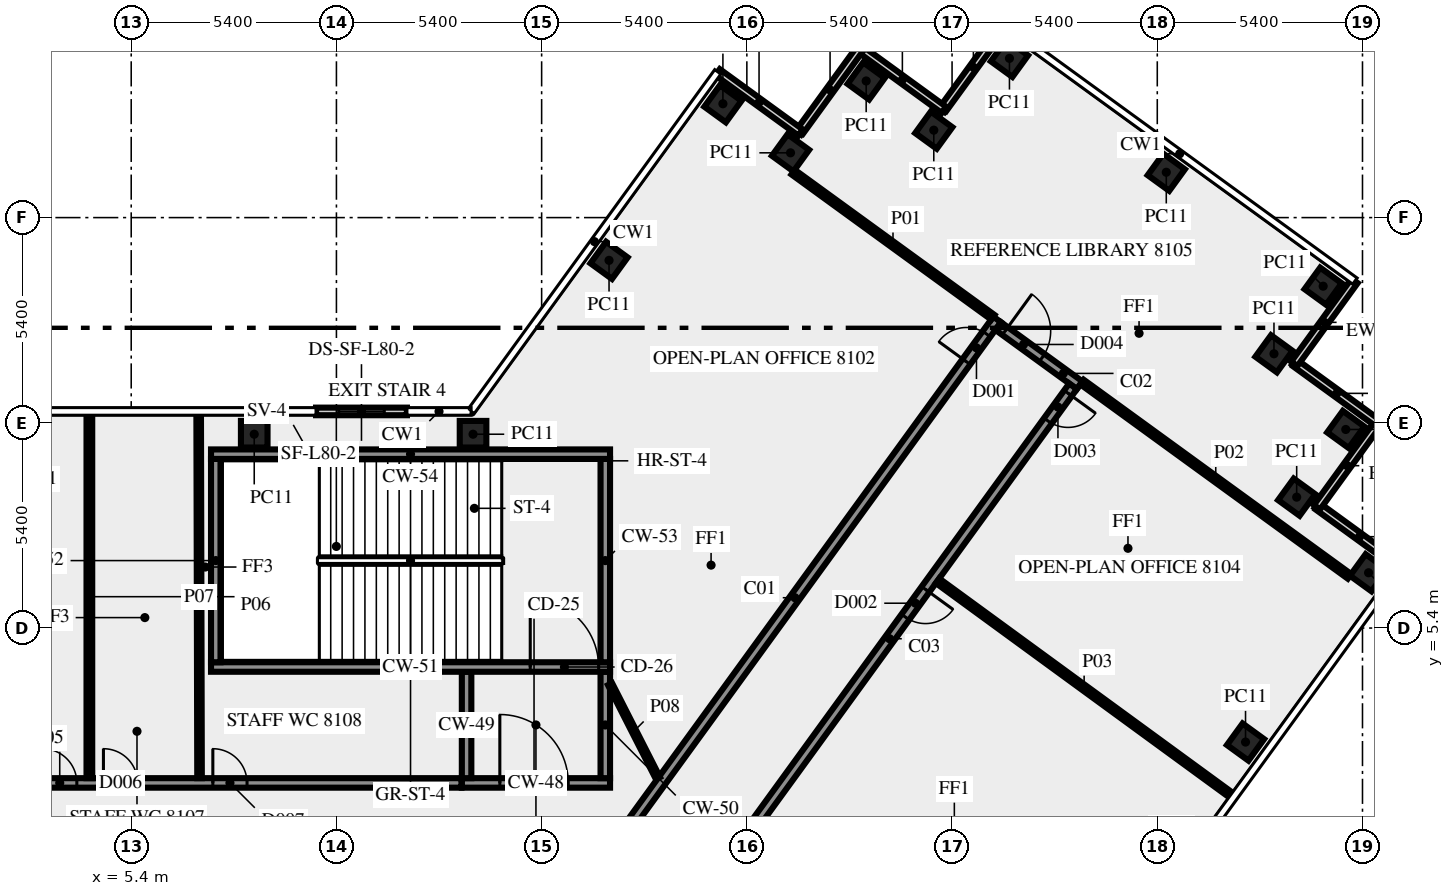
"""IFC4 building model, lengths in metres.
Left out: names, types, materials, properties, quantities, classifications, styles, units other than length and angle.
Written with IfcOpenShell. Run it as: python <this file> out.ifc"""

import sys

from ifc_helpers import new_model, si_unit, direction, frame, frame_2d, origin, origin_2d, place, context, subcontext, project, spatial, rectangle, extrude, element, fill, save


model = new_model("IFC4")
c1 = context("Model", 3, precision=1e-05, world=origin(), true_north=direction((0.0, 1.0)))
c2 = subcontext(c1, "Body", "Model", "MODEL_VIEW")
j1 = project(units=[si_unit("LENGTHUNIT", "METRE"), si_unit("PLANEANGLEUNIT", "RADIAN")], contexts=[c1])
p1 = place(None, origin())
s1 = spatial("IfcSite", under=j1, at=p1, CompositionType="ELEMENT")
p2 = place(p1, origin())
s2 = spatial("IfcBuilding", under=s1, at=p2, CompositionType="ELEMENT")
p3 = place(p2, frame((0.0, 0.0, 347.0)))
s3 = spatial("IfcBuildingStorey", under=s2, at=p3, CompositionType="ELEMENT", Elevation=347.0)
for number, where, z_axis, x_axis in (
    (1, (34.722, 2.4, 0.0), (0.0, 0.0, 1.0), (0.588, 0.809, 0.0)),
    (2, (37.96, 6.855, 0.0), (0.0, 0.0, 1.0), (0.588, 0.809, 0.0)),
    (3, (36.068, 8.844, 0.0), (0.0, 0.0, 1.0), (0.588, 0.809, 0.0)),
    (4, (37.36, 10.625, 0.0), (0.0, 0.0, 1.0), (0.588, 0.809, 0.0)),
    (5, (35.471, 12.616, 0.0), (0.0, 0.0, 1.0), (-0.809, 0.588, 0.0)),
    (6, (36.765, 14.395, 0.0), (0.0, 0.0, 1.0), (-0.809, 0.588, 0.0)),
    (7, (32.637, 17.393, 0.0), (0.0, 0.0, 1.0), (-0.809, 0.588, 0.0)),
    (8, (28.51, 20.39, 0.0), (0.0, 0.0, 1.0), (-0.588, -0.809, 0.0)),
    (9, (26.519, 18.5, 0.0), (0.0, 0.0, 1.0), (-0.809, 0.588, 0.0)),
    (10, (24.74, 19.795, 0.0), (0.0, 0.0, 1.0), (-0.588, -0.809, 0.0)),
    (11, (22.749, 17.904, 0.0), (0.0, 0.0, 1.0), (-0.588, -0.809, 0.0)),
    (12, (20.97, 19.195, 0.0), (0.0, 0.0, 1.0), (-0.588, -0.809, 0.0)),
    (13, (17.974, 15.075, 0.0), (0.0, 0.0, 1.0), (-0.588, -0.809, 0.0)),
    (14, (14.395, 10.5, 0.0), (0.0, 0.0, 1.0), (-1.0, 0.0, 0.0)),
    (15, (8.637, 10.5, 0.0), (0.0, 0.0, 1.0), (-1.0, 0.0, 0.0)),
):
    element("IfcColumn", number, at=place(p3, frame(where, z_axis=z_axis, x_axis=x_axis)), inside=s3, PredefinedType="COLUMN", context=c2, shape_type="SweptSolid", body=[
        extrude(rectangle(XDim=0.7, YDim=0.7, at=origin_2d()), origin(), (0.0, 0.0, 1.0), 3.65),
    ])
for number, where, z_axis, x_axis in (
    (16, (38.814, 7.01, 0.0), (0.0, 0.0, 1.0), (-0.809, 0.588, 0.0)),
    (17, (36.602, 8.58, 0.0), (0.0, 0.0, 1.0), (0.588, 0.809, 0.0)),
    (18, (38.216, 10.782, 0.0), (0.0, 0.0, 1.0), (-0.809, 0.588, 0.0)),
    (19, (36.005, 12.352, 0.0), (0.0, 0.0, 1.0), (0.588, 0.809, 0.0)),
):
    element("IfcWall", number, at=place(p3, frame(where, z_axis=z_axis, x_axis=x_axis)), inside=s3, PredefinedType="SOLIDWALL", context=c2, shape_type="SweptSolid", body=[
        extrude(rectangle(XDim=2.7, YDim=0.2, at=frame_2d((1.35, 0.0))), origin(), (0.0, 0.0, 1.0), 3.65),
    ])
for number, where, z_axis, x_axis in (
    (20, (28.354, 21.247, 0.0), (0.0, 0.0, 1.0), (-0.588, -0.809, 0.0)),
    (21, (26.785, 19.036, 0.0), (0.0, 0.0, 1.0), (-0.809, 0.588, 0.0)),
):
    element("IfcWall", number, at=place(p3, frame(where, z_axis=z_axis, x_axis=x_axis)), inside=s3, PredefinedType="SOLIDWALL", context=c2, shape_type="SweptSolid", body=[
        extrude(rectangle(XDim=2.7, YDim=0.2, at=frame_2d((1.35, 0.0))), origin(), (0.0, 0.0, 1.0), 3.65),
    ])
for number, where, z_axis, x_axis in (
    (22, (24.583, 20.65, 0.0), (0.0, 0.0, 1.0), (-0.588, -0.809, 0.0)),
    (23, (23.013, 18.438, 0.0), (0.0, 0.0, 1.0), (-0.809, 0.588, 0.0)),
):
    element("IfcWall", number, at=place(p3, frame(where, z_axis=z_axis, x_axis=x_axis)), inside=s3, PredefinedType="SOLIDWALL", context=c2, shape_type="SweptSolid", body=[
        extrude(rectangle(XDim=2.7, YDim=0.2, at=frame_2d((1.35, 0.0))), origin(), (0.0, 0.0, 1.0), 3.65),
    ])
p4 = place(p3, frame((12.655, 11.1, 0.0), z_axis=(0.0, 0.0, 1.0), x_axis=(-1.0, 0.0, 0.0)))
e24 = element("IfcWall", 24, at=p4, inside=s3, PredefinedType="SOLIDWALL", context=c2, shape_type="SweptSolid", body=[
    extrude(rectangle(XDim=2.392, YDim=0.2, at=frame_2d((1.196, 0.0))), origin(), (0.0, 0.0, 1.0), 3.65),
])
p5 = place(p4, frame((0.596, 0.0, 1.0)))
e25 = element("IfcOpeningElement", 25, at=p5, cuts=e24, PredefinedType="OPENING", context=c2, shape_type="SweptSolid", body=[
    extrude(rectangle(XDim=1.2, YDim=1.2, at=frame_2d((0.6, 0.6))), frame((0.0, 0.11, 0.0), z_axis=(0.0, -1.0, 0.0), x_axis=(1.0, 0.0, 0.0)), (0.0, 0.0, 1.0), 0.22),
])
p6 = place(p3, frame((14.1, 1.325, 0.0), z_axis=(0.0, 0.0, 1.0), x_axis=(1.0, 0.0, 0.0)))
e26 = element("IfcWall", 26, at=p6, inside=s3, PredefinedType="SHEAR", context=c2, shape_type="SweptSolid", body=[
    extrude(rectangle(XDim=3.9, YDim=0.25, at=frame_2d((1.95, 0.0))), origin(), (0.0, 0.0, 1.0), 3.65),
])
p7 = place(p6, frame((1.0, 0.0, 0.0)))
e27 = element("IfcOpeningElement", 27, at=p7, cuts=e26, PredefinedType="OPENING", context=c2, shape_type="SweptSolid", body=[
    extrude(rectangle(XDim=1.8, YDim=2.1, at=frame_2d((0.9, 1.05))), frame((0.0, 0.135, 0.0), z_axis=(0.0, -1.0, 0.0), x_axis=(1.0, 0.0, 0.0)), (0.0, 0.0, 1.0), 0.27),
])
for number, where, z_axis, x_axis in (
    (28, (14.225, 1.45, 0.0), (0.0, 0.0, 1.0), (0.0, 1.0, 0.0)),
    (29, (17.875, 1.45, 0.0), (0.0, 0.0, 1.0), (0.0, 1.0, 0.0)),
):
    element("IfcWall", number, at=place(p3, frame(where, z_axis=z_axis, x_axis=x_axis)), inside=s3, PredefinedType="SHEAR", context=c2, shape_type="SweptSolid", body=[
        extrude(rectangle(XDim=2.8, YDim=0.25, at=frame_2d((1.4, 0.0))), origin(), (0.0, 0.0, 1.0), 3.65),
    ])
p8 = place(p3, frame((7.5, 4.375, 0.0), z_axis=(0.0, 0.0, 1.0), x_axis=(1.0, 0.0, 0.0)))
e30 = element("IfcWall", 30, at=p8, inside=s3, PredefinedType="SHEAR", context=c2, shape_type="SweptSolid", body=[
    extrude(rectangle(XDim=10.5, YDim=0.25, at=frame_2d((5.25, 0.0))), origin(), (0.0, 0.0, 1.0), 3.65),
])
p9 = place(p8, frame((8.4, 0.0, 0.0)))
e31 = element("IfcOpeningElement", 31, at=p9, cuts=e30, PredefinedType="OPENING", context=c2, shape_type="SweptSolid", body=[
    extrude(rectangle(XDim=1.8, YDim=2.1, at=frame_2d((0.9, 1.05))), frame((0.0, 0.135, 0.0), z_axis=(0.0, -1.0, 0.0), x_axis=(1.0, 0.0, 0.0)), (0.0, 0.0, 1.0), 0.27),
])
for number, where, z_axis, x_axis in (
    (32, (7.625, 4.5, 0.0), (0.0, 0.0, 1.0), (0.0, 1.0, 0.0)),
    (33, (17.875, 4.5, 0.0), (0.0, 0.0, 1.0), (0.0, 1.0, 0.0)),
):
    element("IfcWall", number, at=place(p3, frame(where, z_axis=z_axis, x_axis=x_axis)), inside=s3, PredefinedType="SHEAR", context=c2, shape_type="SweptSolid", body=[
        extrude(rectangle(XDim=5.35, YDim=0.25, at=frame_2d((2.675, 0.0))), origin(), (0.0, 0.0, 1.0), 3.65),
    ])
p10 = place(p3, frame((7.5, 9.975, 0.0), z_axis=(0.0, 0.0, 1.0), x_axis=(1.0, 0.0, 0.0)))
e34 = element("IfcWall", 34, at=p10, inside=s3, PredefinedType="SHEAR", context=c2, shape_type="SweptSolid", body=[
    extrude(rectangle(XDim=10.5, YDim=0.25, at=frame_2d((5.25, 0.0))), origin(), (0.0, 0.0, 1.0), 3.65),
])
p11 = place(p10, frame((2.0, 0.0, 1.0)))
e35 = element("IfcOpeningElement", 35, at=p11, cuts=e34, PredefinedType="OPENING", context=c2, shape_type="SweptSolid", body=[
    extrude(rectangle(XDim=1.2, YDim=1.2, at=frame_2d((0.6, 0.6))), frame((0.0, 0.135, 0.0), z_axis=(0.0, -1.0, 0.0), x_axis=(1.0, 0.0, 0.0)), (0.0, 0.0, 1.0), 0.27),
])
p12 = place(p3, frame((17.545, -1.125, 0.0), z_axis=(0.0, 0.0, 1.0), x_axis=(0.58779555165, 0.809009511354, 0.0)))
e36 = element("IfcWall", 36, at=p12, inside=s3, PredefinedType="SOLIDWALL", context=c2, shape_type="SweptSolid", body=[
    extrude(rectangle(XDim=18.103, YDim=0.25, at=frame_2d((9.052, 0.0))), origin(), (0.0, 0.0, 1.0), 3.65),
])
p13 = place(p12, frame((16.728, 0.0, 0.0)))
e37 = element("IfcOpeningElement", 37, at=p13, cuts=e36, PredefinedType="OPENING", context=c2, shape_type="SweptSolid", body=[
    extrude(rectangle(XDim=0.9, YDim=2.1, at=frame_2d((0.45, 1.05))), frame((0.0, 0.135, 0.0), z_axis=(0.0, -1.0, 0.0), x_axis=(1.0, 0.0, 0.0)), (0.0, 0.0, 1.0), 0.27),
])
p14 = place(p3, frame((28.213, 13.346, 0.0), z_axis=(0.0, 0.0, 1.0), x_axis=(0.809006914995, -0.587799125119, 0.0)))
e38 = element("IfcWall", 38, at=p14, inside=s3, PredefinedType="SOLIDWALL", context=c2, shape_type="SweptSolid", body=[
    extrude(rectangle(XDim=2.65, YDim=0.25, at=frame_2d((1.325, 0.0))), origin(), (0.0, 0.0, 1.0), 3.65),
])
p15 = place(p14, frame((0.225, 0.0, 0.0)))
e39 = element("IfcOpeningElement", 39, at=p15, cuts=e38, PredefinedType="OPENING", context=c2, shape_type="SweptSolid", body=[
    extrude(rectangle(XDim=1.2, YDim=2.1, at=frame_2d((0.6, 1.05))), frame((0.0, 0.135, 0.0), z_axis=(0.0, -1.0, 0.0), x_axis=(1.0, 0.0, 0.0)), (0.0, 0.0, 1.0), 0.27),
])
p16 = place(p3, frame((30.183, 11.761, 0.0), z_axis=(0.0, 0.0, 1.0), x_axis=(-0.587781762867, -0.80901952958, 0.0)))
e40 = element("IfcWall", 40, at=p16, inside=s3, PredefinedType="SOLIDWALL", context=c2, shape_type="SweptSolid", body=[
    extrude(rectangle(XDim=16.42, YDim=0.25, at=frame_2d((8.21, 0.0))), origin(), (0.0, 0.0, 1.0), 3.65),
])
p17 = place(p16, frame((0.225, 0.0, 0.0)))
e41 = element("IfcOpeningElement", 41, at=p17, cuts=e40, PredefinedType="OPENING", context=c2, shape_type="SweptSolid", body=[
    extrude(rectangle(XDim=0.9, YDim=2.1, at=frame_2d((0.45, 1.05))), frame((0.0, 0.135, 0.0), z_axis=(0.0, -1.0, 0.0), x_axis=(1.0, 0.0, 0.0)), (0.0, 0.0, 1.0), 0.27),
])
p18 = place(p16, frame((6.605, 0.0, 0.0)))
e42 = element("IfcOpeningElement", 42, at=p18, cuts=e40, PredefinedType="OPENING", context=c2, shape_type="SweptSolid", body=[
    extrude(rectangle(XDim=0.9, YDim=2.1, at=frame_2d((0.45, 1.05))), frame((0.0, 0.135, 0.0), z_axis=(0.0, -1.0, 0.0), x_axis=(1.0, 0.0, 0.0)), (0.0, 0.0, 1.0), 0.27),
])
p19 = place(p3, frame((-5.246, 1.325, 0.0), z_axis=(0.0, 0.0, 1.0), x_axis=(1.0, 0.0, 0.0)))
e43 = element("IfcWall", 43, at=p19, inside=s3, PredefinedType="SOLIDWALL", context=c2, shape_type="SweptSolid", body=[
    extrude(rectangle(XDim=19.336, YDim=0.25, at=frame_2d((9.668, 0.0))), origin(), (0.0, 0.0, 1.0), 3.65),
])
p20 = place(p19, frame((8.315, 0.0, 0.0)))
e44 = element("IfcOpeningElement", 44, at=p20, cuts=e43, PredefinedType="OPENING", context=c2, shape_type="SweptSolid", body=[
    extrude(rectangle(XDim=0.9, YDim=2.1, at=frame_2d((0.45, 1.05))), frame((0.0, 0.135, 0.0), z_axis=(0.0, -1.0, 0.0), x_axis=(1.0, 0.0, 0.0)), (0.0, 0.0, 1.0), 0.27),
])
p21 = place(p19, frame((9.915, 0.0, 0.0)))
e45 = element("IfcOpeningElement", 45, at=p21, cuts=e43, PredefinedType="OPENING", context=c2, shape_type="SweptSolid", body=[
    extrude(rectangle(XDim=0.9, YDim=2.1, at=frame_2d((0.45, 1.05))), frame((0.0, 0.135, 0.0), z_axis=(0.0, -1.0, 0.0), x_axis=(1.0, 0.0, 0.0)), (0.0, 0.0, 1.0), 0.27),
])
p22 = place(p19, frame((12.794, 0.0, 0.0)))
e46 = element("IfcOpeningElement", 46, at=p22, cuts=e43, PredefinedType="OPENING", context=c2, shape_type="SweptSolid", body=[
    extrude(rectangle(XDim=0.9, YDim=2.1, at=frame_2d((0.45, 1.05))), frame((0.0, 0.135, 0.0), z_axis=(0.0, -1.0, 0.0), x_axis=(1.0, 0.0, 0.0)), (0.0, 0.0, 1.0), 0.27),
])
p23 = place(p3, frame((28.073, 13.578, 0.0), z_axis=(0.0, 0.0, 1.0), x_axis=(-0.809000932727, 0.587807358619, 0.0)))
e47 = element("IfcWall", 47, at=p23, inside=s3, PredefinedType="PARTITIONING", context=c2, shape_type="SweptSolid", body=[
    extrude(rectangle(XDim=6.496, YDim=0.15, at=frame_2d((3.248, 0.0))), origin(), (0.0, 0.0, 1.0), 3.65),
])
p24 = place(p3, frame((37.458, 6.76, 0.0), z_axis=(0.0, 0.0, 1.0), x_axis=(-0.809016295501, 0.587786214209, 0.0)))
e48 = element("IfcWall", 48, at=p24, inside=s3, PredefinedType="PARTITIONING", context=c2, shape_type="SweptSolid", body=[
    extrude(rectangle(XDim=8.7, YDim=0.15, at=frame_2d((4.35, 0.0))), origin(), (0.0, 0.0, 1.0), 3.65),
])
for number, where, z_axis, x_axis in (
    (49, (26.619, 6.643, 0.0), (0.0, 0.0, 1.0), (0.808, -0.59, 0.0)),
    (50, (4.299, 1.45, 0.0), (0.0, 0.0, 1.0), (0.0, 1.0, 0.0)),
):
    element("IfcWall", number, at=place(p3, frame(where, z_axis=z_axis, x_axis=x_axis)), inside=s3, PredefinedType="PARTITIONING", context=c2, shape_type="SweptSolid", body=[
        extrude(rectangle(XDim=9.55, YDim=0.15, at=frame_2d((4.775, 0.0))), origin(), (0.0, 0.0, 1.0), 2.95),
    ])
p25 = place(p3, frame((7.198, 1.45, 0.0), z_axis=(0.0, 0.0, 1.0), x_axis=(-0.002377476217, 0.999997173799, 0.0)))
e51 = element("IfcWall", 51, at=p25, inside=s3, PredefinedType="PARTITIONING", context=c2, shape_type="SweptSolid", body=[
    extrude(rectangle(XDim=9.55, YDim=0.12, at=frame_2d((4.775, 0.0))), origin(), (0.0, 0.0, 1.0), 2.95),
])
p26 = place(p3, frame((18.0, 3.925, 0.0), z_axis=(0.0, 0.0, 1.0), x_axis=(0.453950796792, -0.891026752736, 0.0)))
e52 = element("IfcWall", 52, at=p26, inside=s3, PredefinedType="PARTITIONING", context=c2, shape_type="SweptSolid", body=[
    extrude(rectangle(XDim=2.778, YDim=0.12, at=frame_2d((1.389, 0.0))), origin(), (0.0, 0.0, 1.0), 3.65),
])
p27 = place(p5, origin())
e53 = element("IfcWindow", 53, at=p27, inside=s3, PartitioningType="SINGLE_PANEL", PredefinedType="WINDOW", context=c2, shape_type="SweptSolid", body=[
    extrude(rectangle(XDim=1.2, YDim=1.2, at=frame_2d((0.6, 0.6))), frame((0.0, 0.03, 0.0), z_axis=(0.0, -1.0, 0.0), x_axis=(1.0, 0.0, 0.0)), (0.0, 0.0, 1.0), 0.06),
])
fill(e25, e53)
p28 = place(p7, origin())
e54 = element("IfcDoor", 54, at=p28, inside=s3, OperationType="DOUBLE_DOOR_SINGLE_SWING", PredefinedType="DOOR", context=c2, shape_type="SweptSolid", body=[
    extrude(rectangle(XDim=1.8, YDim=2.1, at=frame_2d((0.9, 1.05))), frame((0.0, 0.025, 0.0), z_axis=(0.0, -1.0, 0.0), x_axis=(1.0, 0.0, 0.0)), (0.0, 0.0, 1.0), 0.05),
])
fill(e27, e54)
p29 = place(p9, origin())
e55 = element("IfcDoor", 55, at=p29, inside=s3, OperationType="DOUBLE_DOOR_SINGLE_SWING", PredefinedType="DOOR", context=c2, shape_type="SweptSolid", body=[
    extrude(rectangle(XDim=1.8, YDim=2.1, at=frame_2d((0.9, 1.05))), frame((0.0, 0.025, 0.0), z_axis=(0.0, -1.0, 0.0), x_axis=(1.0, 0.0, 0.0)), (0.0, 0.0, 1.0), 0.05),
])
fill(e31, e55)
p30 = place(p11, origin())
e56 = element("IfcWindow", 56, at=p30, inside=s3, PartitioningType="SINGLE_PANEL", PredefinedType="WINDOW", context=c2, shape_type="SweptSolid", body=[
    extrude(rectangle(XDim=1.2, YDim=1.2, at=frame_2d((0.6, 0.6))), frame((0.0, 0.03, 0.0), z_axis=(0.0, -1.0, 0.0), x_axis=(1.0, 0.0, 0.0)), (0.0, 0.0, 1.0), 0.06),
])
fill(e35, e56)
p31 = place(p13, origin())
e57 = element("IfcDoor", 57, at=p31, inside=s3, OperationType="SINGLE_SWING_RIGHT", PredefinedType="DOOR", context=c2, shape_type="SweptSolid", body=[
    extrude(rectangle(XDim=0.9, YDim=2.1, at=frame_2d((0.45, 1.05))), frame((0.0, 0.025, 0.0), z_axis=(0.0, -1.0, 0.0), x_axis=(1.0, 0.0, 0.0)), (0.0, 0.0, 1.0), 0.05),
])
fill(e37, e57)
p32 = place(p17, origin())
e58 = element("IfcDoor", 58, at=p32, inside=s3, OperationType="SINGLE_SWING_LEFT", PredefinedType="DOOR", context=c2, shape_type="SweptSolid", body=[
    extrude(rectangle(XDim=0.9, YDim=2.1, at=frame_2d((0.45, 1.05))), frame((0.0, 0.025, 0.0), z_axis=(0.0, -1.0, 0.0), x_axis=(1.0, 0.0, 0.0)), (0.0, 0.0, 1.0), 0.05),
])
fill(e41, e58)
p33 = place(p15, origin())
e59 = element("IfcDoor", 59, at=p33, inside=s3, OperationType="SINGLE_SWING_LEFT", PredefinedType="DOOR", context=c2, shape_type="SweptSolid", body=[
    extrude(rectangle(XDim=1.2, YDim=2.1, at=frame_2d((0.6, 1.05))), frame((0.0, 0.025, 0.0), z_axis=(0.0, -1.0, 0.0), x_axis=(1.0, 0.0, 0.0)), (0.0, 0.0, 1.0), 0.05),
])
fill(e39, e59)
p34 = place(p18, origin())
e60 = element("IfcDoor", 60, at=p34, inside=s3, OperationType="SINGLE_SWING_LEFT", PredefinedType="DOOR", context=c2, shape_type="SweptSolid", body=[
    extrude(rectangle(XDim=0.9, YDim=2.1, at=frame_2d((0.45, 1.05))), frame((0.0, 0.025, 0.0), z_axis=(0.0, -1.0, 0.0), x_axis=(1.0, 0.0, 0.0)), (0.0, 0.0, 1.0), 0.05),
])
fill(e42, e60)
p35 = place(p20, origin())
e61 = element("IfcDoor", 61, at=p35, inside=s3, OperationType="SINGLE_SWING_RIGHT", PredefinedType="DOOR", context=c2, shape_type="SweptSolid", body=[
    extrude(rectangle(XDim=0.9, YDim=2.1, at=frame_2d((0.45, 1.05))), frame((0.0, 0.025, 0.0), z_axis=(0.0, -1.0, 0.0), x_axis=(1.0, 0.0, 0.0)), (0.0, 0.0, 1.0), 0.05),
])
fill(e44, e61)
p36 = place(p21, origin())
e62 = element("IfcDoor", 62, at=p36, inside=s3, OperationType="SINGLE_SWING_LEFT", PredefinedType="DOOR", context=c2, shape_type="SweptSolid", body=[
    extrude(rectangle(XDim=0.9, YDim=2.1, at=frame_2d((0.45, 1.05))), frame((0.0, 0.025, 0.0), z_axis=(0.0, -1.0, 0.0), x_axis=(1.0, 0.0, 0.0)), (0.0, 0.0, 1.0), 0.05),
])
fill(e45, e62)
p37 = place(p22, origin())
e63 = element("IfcDoor", 63, at=p37, inside=s3, OperationType="SINGLE_SWING_LEFT", PredefinedType="DOOR", context=c2, shape_type="SweptSolid", body=[
    extrude(rectangle(XDim=0.9, YDim=2.1, at=frame_2d((0.45, 1.05))), frame((0.0, 0.025, 0.0), z_axis=(0.0, -1.0, 0.0), x_axis=(1.0, 0.0, 0.0)), (0.0, 0.0, 1.0), 0.05),
])
fill(e46, e63)
save(model, sys.argv[1])
